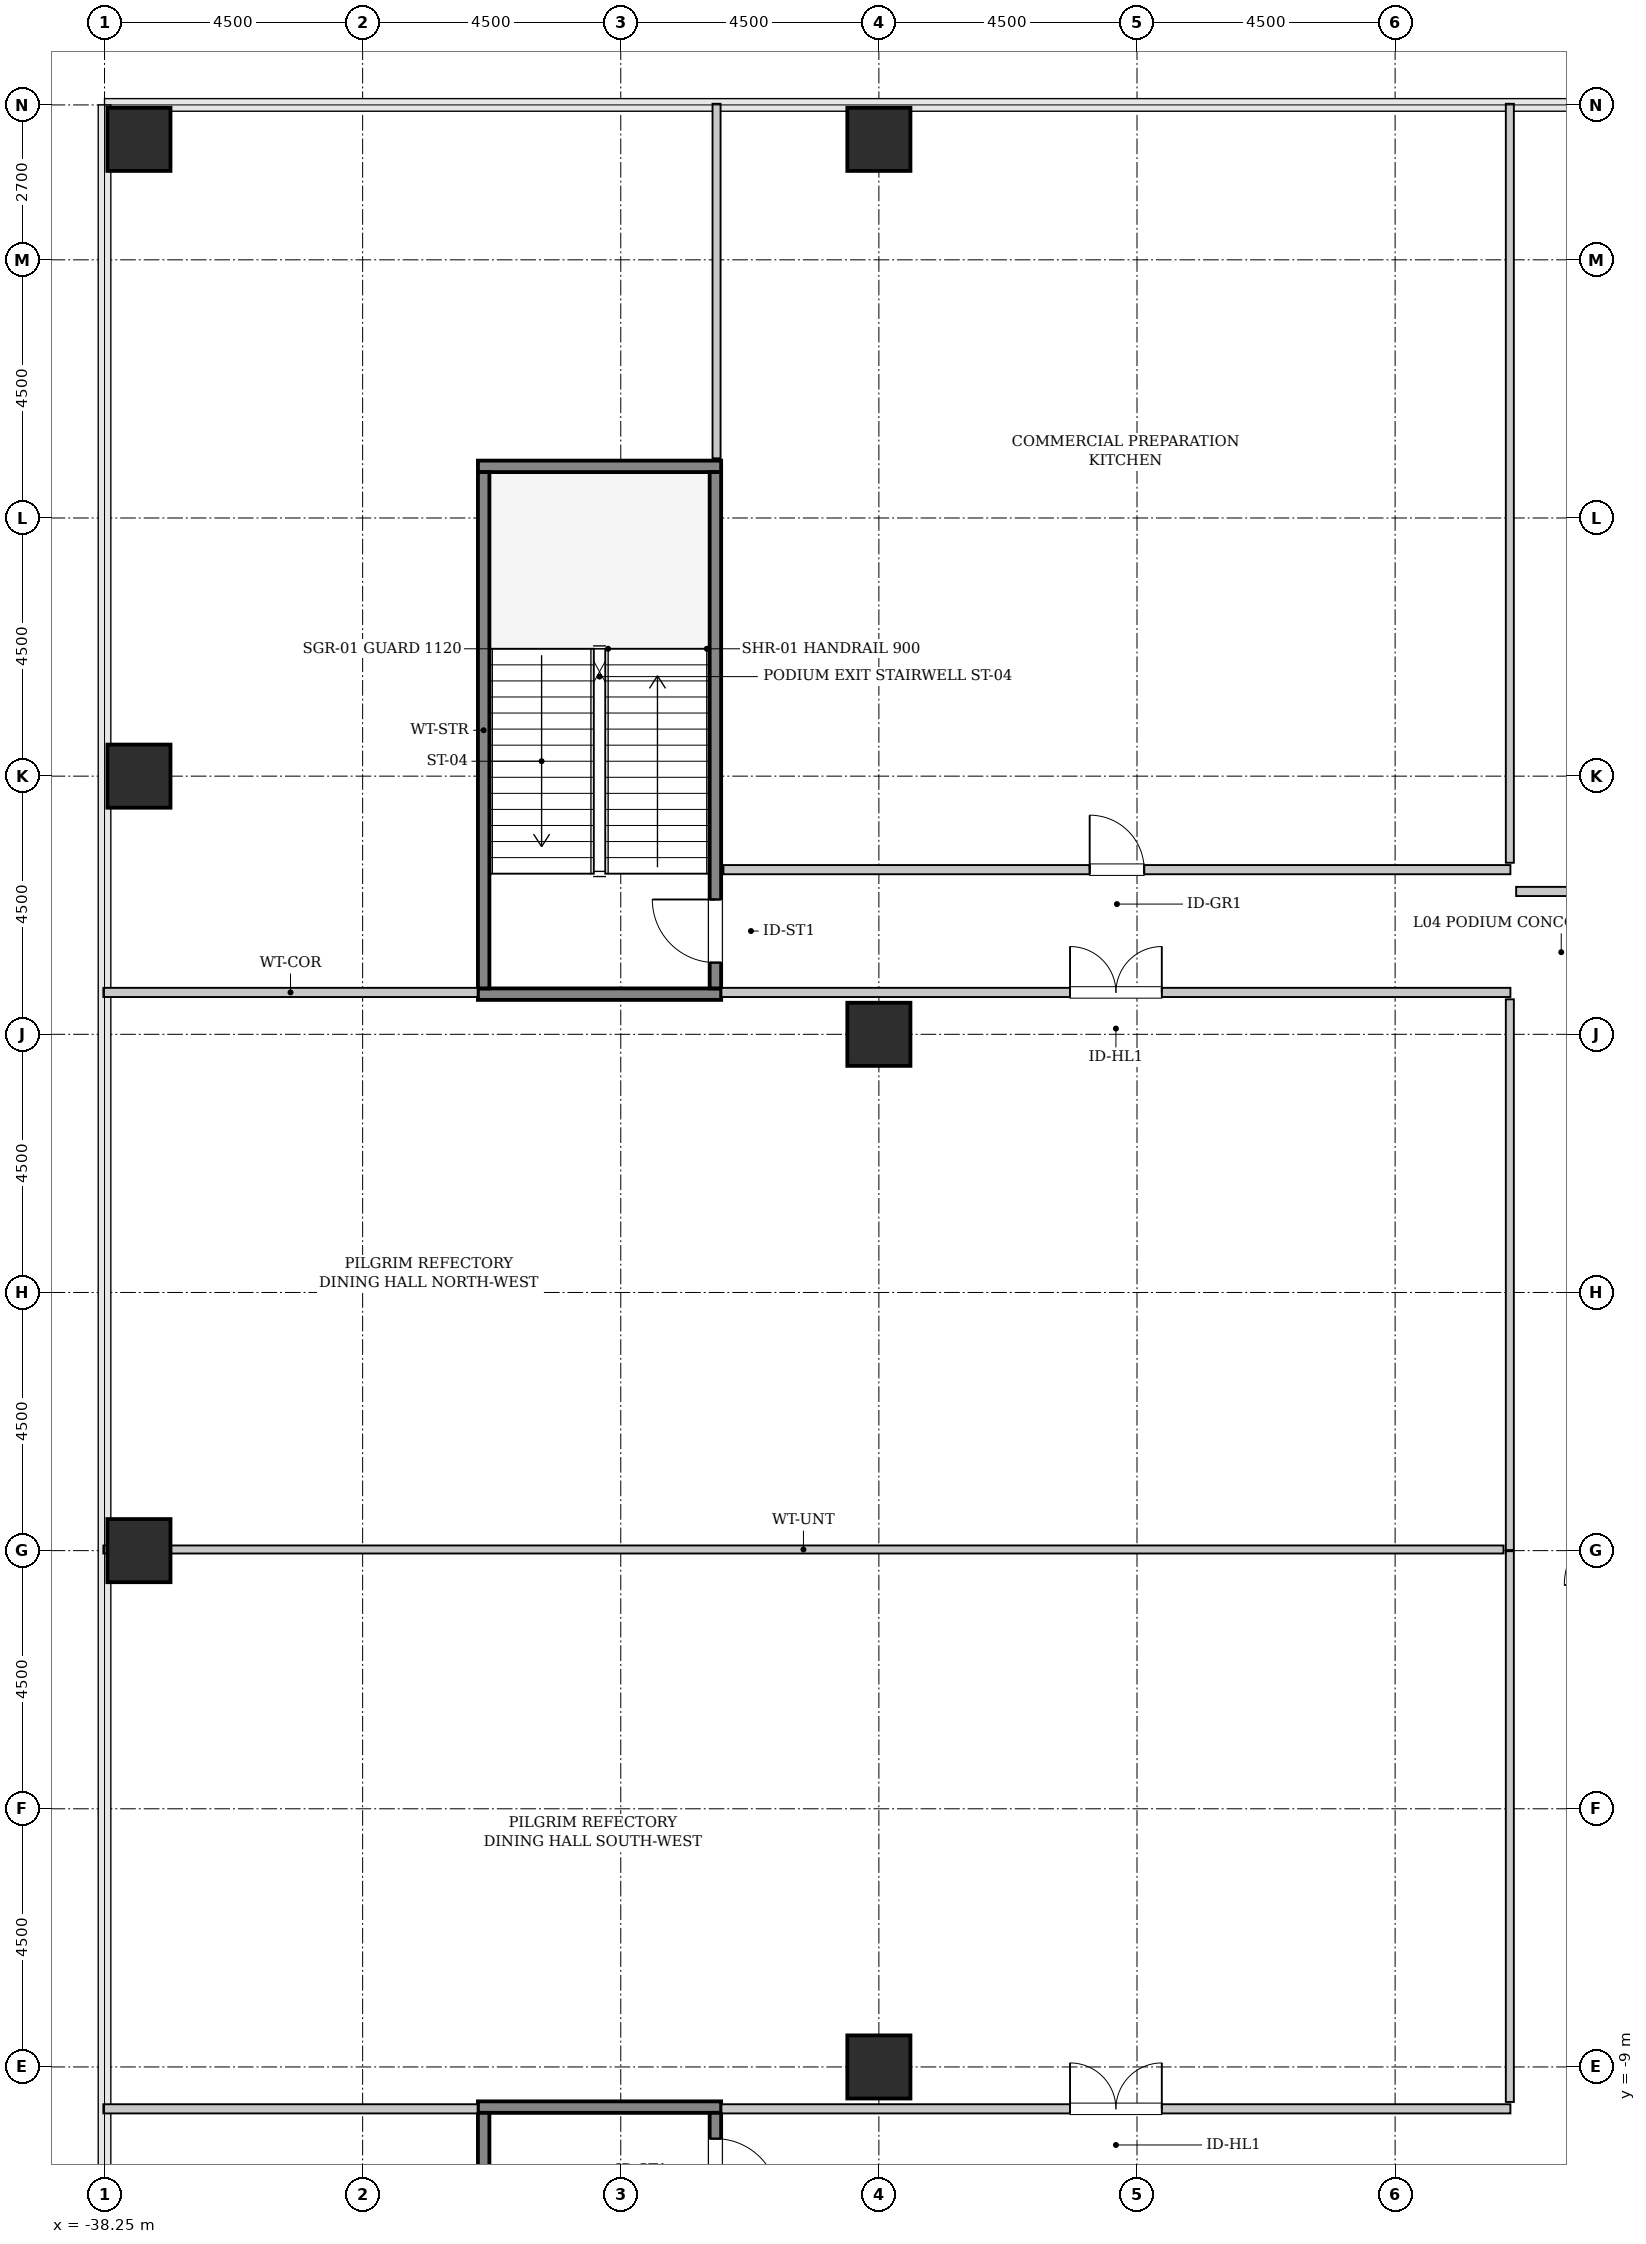
"""IFC4 building model, lengths in metres.
Left out: names, types, materials, properties, quantities, classifications, styles, units other than length and angle.
Written with IfcOpenShell. Run it as: python <this file> out.ifc"""

import sys

from ifc_helpers import new_model, si_unit, direction, frame, frame_2d, origin, origin_2d, place, context, subcontext, project, spatial, rectangle, hollow_rectangle, extrude, source, transform, mapped, element, fill, save


model = new_model("IFC4")
c1 = context("Model", 3, precision=1e-05, world=origin(), true_north=direction((0.0, 1.0)))
c2 = subcontext(c1, "Body", "Model", "MODEL_VIEW")
j1 = project(units=[si_unit("LENGTHUNIT", "METRE"), si_unit("PLANEANGLEUNIT", "RADIAN")], contexts=[c1])
p1 = place(None, origin())
s1 = spatial("IfcSite", under=j1, at=p1, CompositionType="ELEMENT")
p2 = place(p1, origin())
s2 = spatial("IfcBuilding", under=s1, at=p2, CompositionType="ELEMENT")
p3 = place(p2, frame((0.0, 0.0, 22.2)))
s3 = spatial("IfcBuildingStorey", under=s2, at=p3, CompositionType="ELEMENT", Elevation=22.2)
m1 = source(origin(), c2, "Body", "SweptSolid", [
    extrude(hollow_rectangle(XDim=1.1, YDim=1.1, WallThickness=0.055, InnerFilletRadius=0.055, OuterFilletRadius=0.11, at=origin_2d()), origin(), (0.0, 0.0, 1.0), 5.4),
])
for number, where, z_axis, x_axis in (
    (1, (-37.65, 0.0, 0.0), (0.0, 0.0, 1.0), (1.0, 0.0, 0.0)),
    (2, (-37.65, 13.5, 0.0), (0.0, 0.0, 1.0), (1.0, 0.0, 0.0)),
    (3, (-37.65, 24.6, 0.0), (0.0, 0.0, 1.0), (1.0, 0.0, 0.0)),
):
    element("IfcColumn", number, at=place(p3, frame(where, z_axis=z_axis, x_axis=x_axis)), inside=s3, PredefinedType="COLUMN", context=c2, shape_type="MappedRepresentation", body=[
        mapped(m1, transform((0.0, 0.0, 0.0), x_axis=(1.0, 0.0, 0.0), y_axis=(0.0, 1.0, 0.0), z_axis=(0.0, 0.0, 1.0), scale=1.0)),
    ])
m2 = source(origin(), c2, "Body", "SweptSolid", [
    extrude(hollow_rectangle(XDim=1.1, YDim=1.1, WallThickness=0.055, InnerFilletRadius=0.055, OuterFilletRadius=0.11, at=origin_2d()), origin(), (0.0, 0.0, 1.0), 5.4),
])
for number, where, z_axis, x_axis in (
    (4, (-24.75, -9.0, 0.0), (0.0, 0.0, 1.0), (1.0, 0.0, 0.0)),
    (5, (-24.75, 9.0, 0.0), (0.0, 0.0, 1.0), (1.0, 0.0, 0.0)),
):
    element("IfcColumn", number, at=place(p3, frame(where, z_axis=z_axis, x_axis=x_axis)), inside=s3, PredefinedType="COLUMN", context=c2, shape_type="MappedRepresentation", body=[
        mapped(m2, transform((0.0, 0.0, 0.0), x_axis=(1.0, 0.0, 0.0), y_axis=(0.0, 1.0, 0.0), z_axis=(0.0, 0.0, 1.0), scale=1.0)),
    ])
p4 = place(p3, frame((-24.75, 24.6, 0.0), z_axis=(0.0, 0.0, 1.0), x_axis=(1.0, 0.0, 0.0)))
e6 = element("IfcColumn", 6, at=p4, inside=s3, PredefinedType="COLUMN", context=c2, shape_type="MappedRepresentation", body=[
    mapped(m1, transform((0.0, 0.0, 0.0), x_axis=(1.0, 0.0, 0.0), y_axis=(0.0, 1.0, 0.0), z_axis=(0.0, 0.0, 1.0), scale=1.0)),
])
m3 = source(origin(), c2, "Body", "SweptSolid", [
    extrude(rectangle(XDim=4.24, YDim=0.2, at=frame_2d((2.12, 0.0))), origin(), (0.0, 0.0, 1.0), 5.4),
])
for number, where, z_axis, x_axis in (
    (7, (-27.5, 9.7, 0.0), (0.0, 0.0, 1.0), (-1.0, 0.0, 0.0)),
    (8, (-27.5, 18.9, 0.0), (0.0, 0.0, 1.0), (-1.0, 0.0, 0.0)),
):
    element("IfcWall", number, at=place(p3, frame(where, z_axis=z_axis, x_axis=x_axis)), inside=s3, PredefinedType="SOLIDWALL", context=c2, shape_type="MappedRepresentation", body=[
        mapped(m3, transform((0.0, 0.0, 0.0), x_axis=(1.0, 0.0, 0.0), y_axis=(0.0, 1.0, 0.0), z_axis=(0.0, 0.0, 1.0), scale=1.0)),
    ])
m4 = source(origin(), c2, "Body", "SweptSolid", [
    extrude(rectangle(XDim=9.0, YDim=0.2, at=frame_2d((4.5, 0.0))), origin(), (0.0, 0.0, 1.0), 5.4),
])
p5 = place(p3, frame((-27.6, 9.8, 0.0), z_axis=(0.0, 0.0, 1.0), x_axis=(0.0, 1.0, 0.0)))
e9 = element("IfcWall", 9, at=p5, inside=s3, PredefinedType="SOLIDWALL", context=c2, shape_type="MappedRepresentation", body=[
    mapped(m4, transform((0.0, 0.0, 0.0), x_axis=(1.0, 0.0, 0.0), y_axis=(0.0, 1.0, 0.0), z_axis=(0.0, 0.0, 1.0), scale=1.0)),
])
p6 = place(p5, frame((0.45, 0.0, 0.0)))
e10 = element("IfcOpeningElement", 10, at=p6, cuts=e9, PredefinedType="OPENING", context=c2, shape_type="SweptSolid", body=[
    extrude(rectangle(XDim=1.1, YDim=2.15, at=frame_2d((0.55, 1.075))), frame((0.0, 0.11, 0.0), z_axis=(0.0, -1.0, 0.0), x_axis=(1.0, 0.0, 0.0)), (0.0, 0.0, 1.0), 0.22),
])
p7 = place(p3, frame((-31.64, 9.8, 0.0), z_axis=(0.0, 0.0, 1.0), x_axis=(0.0, 1.0, 0.0)))
e11 = element("IfcWall", 11, at=p7, inside=s3, PredefinedType="SOLIDWALL", context=c2, shape_type="MappedRepresentation", body=[
    mapped(m4, transform((0.0, 0.0, 0.0), x_axis=(1.0, 0.0, 0.0), y_axis=(0.0, 1.0, 0.0), z_axis=(0.0, 0.0, 1.0), scale=1.0)),
])
p8 = place(p3, frame((-31.74, -9.7, 0.0), z_axis=(0.0, 0.0, 1.0), x_axis=(1.0, 0.0, 0.0)))
e12 = element("IfcWall", 12, at=p8, inside=s3, PredefinedType="SOLIDWALL", context=c2, shape_type="MappedRepresentation", body=[
    mapped(m3, transform((0.0, 0.0, 0.0), x_axis=(1.0, 0.0, 0.0), y_axis=(0.0, 1.0, 0.0), z_axis=(0.0, 0.0, 1.0), scale=1.0)),
])
p9 = place(p3, frame((-31.64, -9.8, 0.0), z_axis=(0.0, 0.0, 1.0), x_axis=(0.0, -1.0, 0.0)))
e13 = element("IfcWall", 13, at=p9, inside=s3, PredefinedType="SOLIDWALL", context=c2, shape_type="MappedRepresentation", body=[
    mapped(m4, transform((0.0, 0.0, 0.0), x_axis=(1.0, 0.0, 0.0), y_axis=(0.0, 1.0, 0.0), z_axis=(0.0, 0.0, 1.0), scale=1.0)),
])
p10 = place(p3, frame((-27.6, -9.8, 0.0), z_axis=(0.0, 0.0, 1.0), x_axis=(0.0, -1.0, 0.0)))
e14 = element("IfcWall", 14, at=p10, inside=s3, PredefinedType="SOLIDWALL", context=c2, shape_type="MappedRepresentation", body=[
    mapped(m4, transform((0.0, 0.0, 0.0), x_axis=(1.0, 0.0, 0.0), y_axis=(0.0, 1.0, 0.0), z_axis=(0.0, 0.0, 1.0), scale=1.0)),
])
p11 = place(p10, frame((0.45, 0.0, 0.0)))
e15 = element("IfcOpeningElement", 15, at=p11, cuts=e14, PredefinedType="OPENING", context=c2, shape_type="SweptSolid", body=[
    extrude(rectangle(XDim=1.1, YDim=2.15, at=frame_2d((0.55, 1.075))), frame((0.0, 0.11, 0.0), z_axis=(0.0, -1.0, 0.0), x_axis=(1.0, 0.0, 0.0)), (0.0, 0.0, 1.0), 0.22),
])
m5 = source(origin(), c2, "Body", "SweptSolid", [
    extrude(rectangle(XDim=13.755, YDim=0.16, at=frame_2d((6.877, 0.0))), origin(), (0.0, 0.0, 1.0), 4.905),
])
p12 = place(p3, frame((-27.495, 9.73, 0.0), z_axis=(0.0, 0.0, 1.0), x_axis=(1.0, 0.0, 0.0)))
e16 = element("IfcWall", 16, at=p12, inside=s3, PredefinedType="PARTITIONING", context=c2, shape_type="MappedRepresentation", body=[
    mapped(m5, transform((0.0, 0.0, 0.0), x_axis=(1.0, 0.0, 0.0), y_axis=(0.0, 1.0, 0.0), z_axis=(0.0, 0.0, 1.0), scale=1.0)),
])
p13 = place(p12, frame((6.077, 0.0, 0.0)))
e17 = element("IfcOpeningElement", 17, at=p13, cuts=e16, PredefinedType="OPENING", context=c2, shape_type="SweptSolid", body=[
    extrude(rectangle(XDim=1.6, YDim=2.3, at=frame_2d((0.8, 1.15))), frame((0.0, 0.09, 0.0), z_axis=(0.0, -1.0, 0.0), x_axis=(1.0, 0.0, 0.0)), (0.0, 0.0, 1.0), 0.18),
])
m6 = source(origin(), c2, "Body", "SweptSolid", [
    extrude(rectangle(XDim=6.525, YDim=0.16, at=frame_2d((3.262, 0.0))), origin(), (0.0, 0.0, 1.0), 4.905),
])
p14 = place(p3, frame((-38.27, 9.73, 0.0), z_axis=(0.0, 0.0, 1.0), x_axis=(1.0, 0.0, 0.0)))
e18 = element("IfcWall", 18, at=p14, inside=s3, PredefinedType="PARTITIONING", context=c2, shape_type="MappedRepresentation", body=[
    mapped(m6, transform((0.0, 0.0, 0.0), x_axis=(1.0, 0.0, 0.0), y_axis=(0.0, 1.0, 0.0), z_axis=(0.0, 0.0, 1.0), scale=1.0)),
])
m7 = source(origin(), c2, "Body", "SweptSolid", [
    extrude(rectangle(XDim=9.6, YDim=0.14, at=frame_2d((4.8, 0.0))), origin(), (0.0, 0.0, 1.0), 4.905),
])
p15 = place(p3, frame((-13.75, 0.01, 0.0), z_axis=(0.0, 0.0, 1.0), x_axis=(0.0, 1.0, 0.0)))
e19 = element("IfcWall", 19, at=p15, inside=s3, PredefinedType="PARTITIONING", context=c2, shape_type="MappedRepresentation", body=[
    mapped(m7, transform((0.0, 0.0, 0.0), x_axis=(1.0, 0.0, 0.0), y_axis=(0.0, 1.0, 0.0), z_axis=(0.0, 0.0, 1.0), scale=1.0)),
])
m8 = source(origin(), c2, "Body", "SweptSolid", [
    extrude(rectangle(XDim=24.41, YDim=0.14, at=frame_2d((12.205, 0.0))), origin(), (0.0, 0.0, 1.0), 4.905),
])
p16 = place(p3, frame((-38.27, 0.02, 0.0), z_axis=(0.0, 0.0, 1.0), x_axis=(1.0, 0.0, 0.0)))
e20 = element("IfcWall", 20, at=p16, inside=s3, PredefinedType="PARTITIONING", context=c2, shape_type="MappedRepresentation", body=[
    mapped(m8, transform((0.0, 0.0, 0.0), x_axis=(1.0, 0.0, 0.0), y_axis=(0.0, 1.0, 0.0), z_axis=(0.0, 0.0, 1.0), scale=1.0)),
])
p17 = place(p3, frame((-38.27, -9.73, 0.0), z_axis=(0.0, 0.0, 1.0), x_axis=(1.0, 0.0, 0.0)))
e21 = element("IfcWall", 21, at=p17, inside=s3, PredefinedType="PARTITIONING", context=c2, shape_type="MappedRepresentation", body=[
    mapped(m6, transform((0.0, 0.0, 0.0), x_axis=(1.0, 0.0, 0.0), y_axis=(0.0, 1.0, 0.0), z_axis=(0.0, 0.0, 1.0), scale=1.0)),
])
p18 = place(p3, frame((-27.495, -9.73, 0.0), z_axis=(0.0, 0.0, 1.0), x_axis=(1.0, 0.0, 0.0)))
e22 = element("IfcWall", 22, at=p18, inside=s3, PredefinedType="PARTITIONING", context=c2, shape_type="MappedRepresentation", body=[
    mapped(m5, transform((0.0, 0.0, 0.0), x_axis=(1.0, 0.0, 0.0), y_axis=(0.0, 1.0, 0.0), z_axis=(0.0, 0.0, 1.0), scale=1.0)),
])
p19 = place(p18, frame((6.077, 0.0, 0.0)))
e23 = element("IfcOpeningElement", 23, at=p19, cuts=e22, PredefinedType="OPENING", context=c2, shape_type="SweptSolid", body=[
    extrude(rectangle(XDim=1.6, YDim=2.3, at=frame_2d((0.8, 1.15))), frame((0.0, 0.09, 0.0), z_axis=(0.0, -1.0, 0.0), x_axis=(1.0, 0.0, 0.0)), (0.0, 0.0, 1.0), 0.18),
])
p20 = place(p3, frame((-13.75, -9.61, 0.0), z_axis=(0.0, 0.0, 1.0), x_axis=(0.0, 1.0, 0.0)))
e24 = element("IfcWall", 24, at=p20, inside=s3, PredefinedType="PARTITIONING", context=c2, shape_type="MappedRepresentation", body=[
    mapped(m7, transform((0.0, 0.0, 0.0), x_axis=(1.0, 0.0, 0.0), y_axis=(0.0, 1.0, 0.0), z_axis=(0.0, 0.0, 1.0), scale=1.0)),
])
m9 = source(origin(), c2, "Body", "SweptSolid", [
    extrude(rectangle(XDim=13.72, YDim=0.16, at=frame_2d((6.86, 0.0))), origin(), (0.0, 0.0, 1.0), 4.905),
])
p21 = place(p3, frame((-27.46, 11.87, 0.0), z_axis=(0.0, 0.0, 1.0), x_axis=(1.0, 0.0, 0.0)))
e25 = element("IfcWall", 25, at=p21, inside=s3, PredefinedType="PARTITIONING", context=c2, shape_type="MappedRepresentation", body=[
    mapped(m9, transform((0.0, 0.0, 0.0), x_axis=(1.0, 0.0, 0.0), y_axis=(0.0, 1.0, 0.0), z_axis=(0.0, 0.0, 1.0), scale=1.0)),
])
p22 = place(p21, frame((6.385, 0.0, 0.0)))
e26 = element("IfcOpeningElement", 26, at=p22, cuts=e25, PredefinedType="OPENING", context=c2, shape_type="SweptSolid", body=[
    extrude(rectangle(XDim=0.95, YDim=2.1, at=frame_2d((0.475, 1.05))), frame((0.0, 0.09, 0.0), z_axis=(0.0, -1.0, 0.0), x_axis=(1.0, 0.0, 0.0)), (0.0, 0.0, 1.0), 0.18),
])
m10 = source(origin(), c2, "Body", "SweptSolid", [
    extrude(rectangle(XDim=6.18, YDim=0.14, at=frame_2d((3.09, 0.0))), origin(), (0.0, 0.0, 1.0), 4.905),
])
p23 = place(p3, frame((-27.58, 19.04, 0.0), z_axis=(0.0, 0.0, 1.0), x_axis=(0.0, 1.0, 0.0)))
e27 = element("IfcWall", 27, at=p23, inside=s3, PredefinedType="PARTITIONING", context=c2, shape_type="MappedRepresentation", body=[
    mapped(m10, transform((0.0, 0.0, 0.0), x_axis=(1.0, 0.0, 0.0), y_axis=(0.0, 1.0, 0.0), z_axis=(0.0, 0.0, 1.0), scale=1.0)),
])
m11 = source(origin(), c2, "Body", "SweptSolid", [
    extrude(rectangle(XDim=13.23, YDim=0.14, at=frame_2d((6.615, 0.0))), origin(), (0.0, 0.0, 1.0), 4.905),
])
p24 = place(p3, frame((-13.75, 11.99, 0.0), z_axis=(0.0, 0.0, 1.0), x_axis=(0.0, 1.0, 0.0)))
e28 = element("IfcWall", 28, at=p24, inside=s3, PredefinedType="PARTITIONING", context=c2, shape_type="MappedRepresentation", body=[
    mapped(m11, transform((0.0, 0.0, 0.0), x_axis=(1.0, 0.0, 0.0), y_axis=(0.0, 1.0, 0.0), z_axis=(0.0, 0.0, 1.0), scale=1.0)),
])
m12 = source(origin(), c2, "Body", "SweptSolid", [
    extrude(rectangle(XDim=16.18, YDim=0.16, at=frame_2d((8.09, 0.0))), origin(), (0.0, 0.0, 1.0), 4.905),
])
p25 = place(p3, frame((-13.64, 11.49, 0.0), z_axis=(0.0, 0.0, 1.0), x_axis=(1.0, 0.0, 0.0)))
e29 = element("IfcWall", 29, at=p25, inside=s3, PredefinedType="PARTITIONING", context=c2, shape_type="MappedRepresentation", body=[
    mapped(m12, transform((0.0, 0.0, 0.0), x_axis=(1.0, 0.0, 0.0), y_axis=(0.0, 1.0, 0.0), z_axis=(0.0, 0.0, 1.0), scale=1.0)),
])
p26 = place(p25, frame((7.615, 0.0, 0.0)))
e30 = element("IfcOpeningElement", 30, at=p26, cuts=e29, PredefinedType="OPENING", context=c2, shape_type="SweptSolid", body=[
    extrude(rectangle(XDim=0.95, YDim=2.1, at=frame_2d((0.475, 1.05))), frame((0.0, 0.09, 0.0), z_axis=(0.0, -1.0, 0.0), x_axis=(1.0, 0.0, 0.0)), (0.0, 0.0, 1.0), 0.18),
])
m13 = source(origin(), c2, "Body", "SweptSolid", [
    extrude(rectangle(XDim=1.1, YDim=2.15, at=frame_2d((0.55, 1.075))), frame((0.0, 0.025, 0.0), z_axis=(0.0, -1.0, 0.0), x_axis=(1.0, 0.0, 0.0)), (0.0, 0.0, 1.0), 0.05),
])
p27 = place(p6, origin())
e31 = element("IfcDoor", 31, at=p27, inside=s3, OperationType="SINGLE_SWING_RIGHT", PredefinedType="DOOR", context=c2, shape_type="MappedRepresentation", body=[
    mapped(m13, transform((0.0, 0.0, 0.0), x_axis=(1.0, 0.0, 0.0), y_axis=(0.0, 1.0, 0.0), z_axis=(0.0, 0.0, 1.0), scale=1.0)),
])
fill(e10, e31)
p28 = place(p11, origin())
e32 = element("IfcDoor", 32, at=p28, inside=s3, OperationType="SINGLE_SWING_RIGHT", PredefinedType="DOOR", context=c2, shape_type="MappedRepresentation", body=[
    mapped(m13, transform((0.0, 0.0, 0.0), x_axis=(1.0, 0.0, 0.0), y_axis=(0.0, 1.0, 0.0), z_axis=(0.0, 0.0, 1.0), scale=1.0)),
])
fill(e15, e32)
m14 = source(origin(), c2, "Body", "SweptSolid", [
    extrude(rectangle(XDim=1.6, YDim=2.3, at=frame_2d((0.8, 1.15))), frame((0.0, 0.025, 0.0), z_axis=(0.0, -1.0, 0.0), x_axis=(1.0, 0.0, 0.0)), (0.0, 0.0, 1.0), 0.05),
])
p29 = place(p13, origin())
e33 = element("IfcDoor", 33, at=p29, inside=s3, OperationType="DOUBLE_DOOR_SINGLE_SWING", PredefinedType="DOOR", context=c2, shape_type="MappedRepresentation", body=[
    mapped(m14, transform((0.0, 0.0, 0.0), x_axis=(1.0, 0.0, 0.0), y_axis=(0.0, 1.0, 0.0), z_axis=(0.0, 0.0, 1.0), scale=1.0)),
])
fill(e17, e33)
p30 = place(p19, origin())
e34 = element("IfcDoor", 34, at=p30, inside=s3, OperationType="DOUBLE_DOOR_SINGLE_SWING", PredefinedType="DOOR", context=c2, shape_type="MappedRepresentation", body=[
    mapped(m14, transform((0.0, 0.0, 0.0), x_axis=(1.0, 0.0, 0.0), y_axis=(0.0, 1.0, 0.0), z_axis=(0.0, 0.0, 1.0), scale=1.0)),
])
fill(e23, e34)
m15 = source(origin(), c2, "Body", "SweptSolid", [
    extrude(rectangle(XDim=0.95, YDim=2.1, at=frame_2d((0.475, 1.05))), frame((0.0, 0.025, 0.0), z_axis=(0.0, -1.0, 0.0), x_axis=(1.0, 0.0, 0.0)), (0.0, 0.0, 1.0), 0.05),
])
p31 = place(p22, origin())
e35 = element("IfcDoor", 35, at=p31, inside=s3, OperationType="SINGLE_SWING_LEFT", PredefinedType="DOOR", context=c2, shape_type="MappedRepresentation", body=[
    mapped(m15, transform((0.0, 0.0, 0.0), x_axis=(1.0, 0.0, 0.0), y_axis=(0.0, 1.0, 0.0), z_axis=(0.0, 0.0, 1.0), scale=1.0)),
])
fill(e26, e35)
save(model, sys.argv[1])
